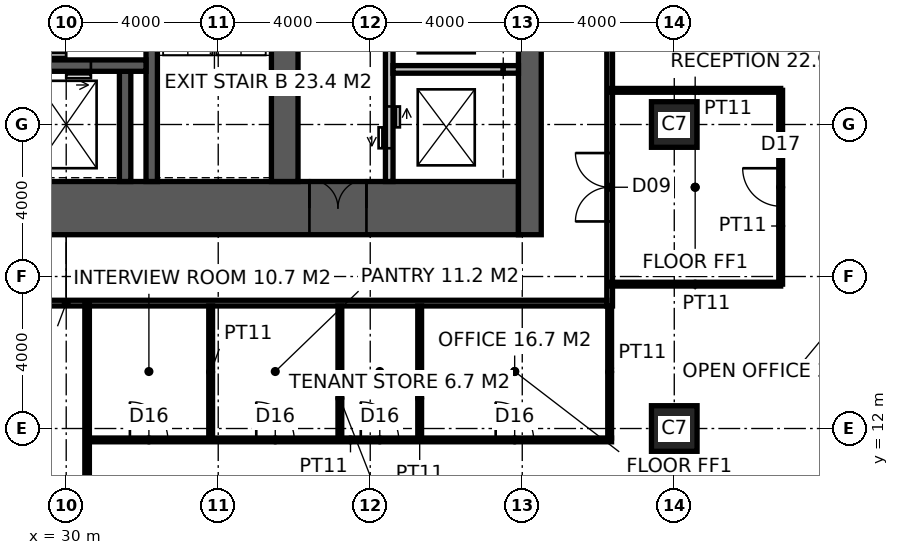
"""IFC4 building model, lengths in metres.
Left out: names, types, materials, properties, quantities, classifications, styles, units other than length and angle.
Written with IfcOpenShell. Run it as: python <this file> out.ifc"""

import sys

from ifc_helpers import new_model, si_unit, direction, frame, frame_2d, origin, origin_2d, place, context, subcontext, project, spatial, rectangle, hollow_rectangle, extrude, element, fill, save


model = new_model("IFC4")
c1 = context("Model", 3, precision=1e-05, world=origin(), true_north=direction((0.0, 1.0)))
c2 = subcontext(c1, "Body", "Model", "MODEL_VIEW")
j1 = project(units=[si_unit("LENGTHUNIT", "METRE"), si_unit("PLANEANGLEUNIT", "RADIAN")], contexts=[c1])
p1 = place(None, origin())
s1 = spatial("IfcSite", under=j1, at=p1, CompositionType="ELEMENT")
p2 = place(p1, origin())
s2 = spatial("IfcBuilding", under=s1, at=p2, CompositionType="ELEMENT")
p3 = place(p2, frame((0.0, 0.0, 43.0)))
s3 = spatial("IfcBuildingStorey", under=s2, at=p3, CompositionType="ELEMENT", Elevation=43.0)
for number, where, z_axis, x_axis in (
    (1, (46.0, 12.0, 0.0), (0.0, 0.0, 1.0), (1.0, 0.0, 0.0)),
    (2, (46.0, 20.0, 0.0), (0.0, 0.0, 1.0), (1.0, 0.0, 0.0)),
):
    element("IfcColumn", number, at=place(p3, frame(where, z_axis=z_axis, x_axis=x_axis)), inside=s3, PredefinedType="COLUMN", context=c2, shape_type="SweptSolid", body=[
        extrude(hollow_rectangle(XDim=1.2, YDim=1.2, WallThickness=0.1, at=origin_2d()), origin(), (0.0, 0.0, 1.0), 4.0),
    ])
p4 = place(p3, frame((18.5, 17.8, -0.15), z_axis=(0.0, 0.0, 1.0), x_axis=(1.0, 0.0, 0.0)))
e3 = element("IfcWall", 3, at=p4, inside=s3, PredefinedType="SHEAR", context=c2, shape_type="SweptSolid", body=[
    extrude(rectangle(XDim=23.4, YDim=1.4, at=frame_2d((11.7, 0.0))), origin(), (0.0, 0.0, 1.0), 4.0),
])
p5 = place(p4, frame((3.45, 0.0, 0.15)))
e4 = element("IfcOpeningElement", 4, at=p5, cuts=e3, PredefinedType="OPENING", context=c2, shape_type="SweptSolid", body=[
    extrude(rectangle(XDim=1.5, YDim=2.4, at=frame_2d((0.75, 1.2))), frame((0.0, 0.71, 0.0), z_axis=(0.0, -1.0, 0.0), x_axis=(1.0, 0.0, 0.0)), (0.0, 0.0, 1.0), 1.42),
])
p6 = place(p4, frame((17.9, 0.0, 0.15)))
e5 = element("IfcOpeningElement", 5, at=p6, cuts=e3, PredefinedType="OPENING", context=c2, shape_type="SweptSolid", body=[
    extrude(rectangle(XDim=1.5, YDim=2.4, at=frame_2d((0.75, 1.2))), frame((0.0, 0.71, 0.0), z_axis=(0.0, -1.0, 0.0), x_axis=(1.0, 0.0, 0.0)), (0.0, 0.0, 1.0), 1.42),
])
p7 = place(p4, frame((0.9, 0.0, 0.15)))
e6 = element("IfcOpeningElement", 6, at=p7, cuts=e3, PredefinedType="OPENING", context=c2, shape_type="SweptSolid", body=[
    extrude(rectangle(XDim=1.0, YDim=2.2, at=frame_2d((0.5, 1.1))), frame((0.0, 0.71, 0.0), z_axis=(0.0, -1.0, 0.0), x_axis=(1.0, 0.0, 0.0)), (0.0, 0.0, 1.0), 1.42),
])
p8 = place(p3, frame((42.2, 17.1, -0.15), z_axis=(0.0, 0.0, 1.0), x_axis=(0.0, 1.0, 0.0)))
e7 = element("IfcWall", 7, at=p8, inside=s3, PredefinedType="SHEAR", context=c2, shape_type="SweptSolid", body=[
    extrude(rectangle(XDim=19.8, YDim=0.6, at=frame_2d((9.9, 0.0))), origin(), (0.0, 0.0, 1.0), 4.0),
])
p9 = place(p3, frame((35.75, 18.5, -0.15), z_axis=(0.0, 0.0, 1.0), x_axis=(0.0, 1.0, 0.0)))
e8 = element("IfcWall", 8, at=p9, inside=s3, PredefinedType="SHEAR", context=c2, shape_type="SweptSolid", body=[
    extrude(rectangle(XDim=17.0, YDim=0.7, at=frame_2d((8.5, 0.0))), origin(), (0.0, 0.0, 1.0), 4.0),
])
p10 = place(p9, frame((9.85, 0.0, 0.15)))
e9 = element("IfcOpeningElement", 9, at=p10, cuts=e8, PredefinedType="OPENING", context=c2, shape_type="SweptSolid", body=[
    extrude(rectangle(XDim=1.0, YDim=2.2, at=frame_2d((0.5, 1.1))), frame((0.0, 0.36, 0.0), z_axis=(0.0, -1.0, 0.0), x_axis=(1.0, 0.0, 0.0)), (0.0, 0.0, 1.0), 0.72),
])
p11 = place(p3, frame((32.25, 18.5, -0.15), z_axis=(0.0, 0.0, 1.0), x_axis=(0.0, 1.0, 0.0)))
e10 = element("IfcWall", 10, at=p11, inside=s3, PredefinedType="SHEAR", context=c2, shape_type="SweptSolid", body=[
    extrude(rectangle(XDim=7.9, YDim=0.3, at=frame_2d((3.95, 0.0))), origin(), (0.0, 0.0, 1.0), 4.0),
])
p12 = place(p3, frame((31.55, 18.5, -0.15), z_axis=(0.0, 0.0, 1.0), x_axis=(0.0, 1.0, 0.0)))
e11 = element("IfcWall", 11, at=p12, inside=s3, PredefinedType="SHEAR", context=c2, shape_type="SweptSolid", body=[
    extrude(rectangle(XDim=2.9, YDim=0.3, at=frame_2d((1.45, 0.0))), origin(), (0.0, 0.0, 1.0), 4.0),
])
p13 = place(p3, frame((28.3, 21.55, -0.15), z_axis=(0.0, 0.0, 1.0), x_axis=(1.0, 0.0, 0.0)))
e12 = element("IfcWall", 12, at=p13, inside=s3, PredefinedType="SHEAR", context=c2, shape_type="SweptSolid", body=[
    extrude(rectangle(XDim=3.8, YDim=0.3, at=frame_2d((1.9, 0.0))), origin(), (0.0, 0.0, 1.0), 4.0),
])
p14 = place(p13, frame((1.05, 0.0, 0.15)))
e13 = element("IfcOpeningElement", 13, at=p14, cuts=e12, PredefinedType="OPENING", context=c2, shape_type="SweptSolid", body=[
    extrude(rectangle(XDim=1.3, YDim=2.4, at=frame_2d((0.65, 1.2))), frame((0.0, 0.16, 0.0), z_axis=(0.0, -1.0, 0.0), x_axis=(1.0, 0.0, 0.0)), (0.0, 0.0, 1.0), 0.32),
])
p15 = place(p3, frame((38.5, 18.5, -0.15), z_axis=(0.0, 0.0, 1.0), x_axis=(0.0, 1.0, 0.0)))
e14 = element("IfcWall", 14, at=p15, inside=s3, PredefinedType="SOLIDWALL", context=c2, shape_type="SweptSolid", body=[
    extrude(rectangle(XDim=11.5, YDim=0.2, at=frame_2d((5.75, 0.0))), origin(), (0.0, 0.0, 1.0), 4.0),
])
p16 = place(p15, frame((0.875, 0.0, 0.15)))
e15 = element("IfcOpeningElement", 15, at=p16, cuts=e14, PredefinedType="OPENING", context=c2, shape_type="SweptSolid", body=[
    extrude(rectangle(XDim=1.1, YDim=2.2, at=frame_2d((0.55, 1.1))), frame((0.0, 0.11, 0.0), z_axis=(0.0, -1.0, 0.0), x_axis=(1.0, 0.0, 0.0)), (0.0, 0.0, 1.0), 0.22),
])
p17 = place(p15, frame((3.825, 0.0, 0.15)))
e16 = element("IfcOpeningElement", 16, at=p17, cuts=e14, PredefinedType="OPENING", context=c2, shape_type="SweptSolid", body=[
    extrude(rectangle(XDim=1.1, YDim=2.2, at=frame_2d((0.55, 1.1))), frame((0.0, 0.11, 0.0), z_axis=(0.0, -1.0, 0.0), x_axis=(1.0, 0.0, 0.0)), (0.0, 0.0, 1.0), 0.22),
])
p18 = place(p15, frame((6.675, 0.0, 0.15)))
e17 = element("IfcOpeningElement", 17, at=p18, cuts=e14, PredefinedType="OPENING", context=c2, shape_type="SweptSolid", body=[
    extrude(rectangle(XDim=1.1, YDim=2.2, at=frame_2d((0.55, 1.1))), frame((0.0, 0.11, 0.0), z_axis=(0.0, -1.0, 0.0), x_axis=(1.0, 0.0, 0.0)), (0.0, 0.0, 1.0), 0.22),
])
p19 = place(p15, frame((9.575, 0.0, 0.15)))
e18 = element("IfcOpeningElement", 18, at=p19, cuts=e14, PredefinedType="OPENING", context=c2, shape_type="SweptSolid", body=[
    extrude(rectangle(XDim=1.1, YDim=2.2, at=frame_2d((0.55, 1.1))), frame((0.0, 0.11, 0.0), z_axis=(0.0, -1.0, 0.0), x_axis=(1.0, 0.0, 0.0)), (0.0, 0.0, 1.0), 0.22),
])
p20 = place(p3, frame((38.6, 21.45, -0.15), z_axis=(0.0, 0.0, 1.0), x_axis=(1.0, 0.0, 0.0)))
e19 = element("IfcWall", 19, at=p20, inside=s3, PredefinedType="SOLIDWALL", context=c2, shape_type="SweptSolid", body=[
    extrude(rectangle(XDim=2.9, YDim=0.2, at=frame_2d((1.45, 0.0))), origin(), (0.0, 0.0, 1.0), 4.0),
])
p21 = place(p3, frame((41.5, 21.45, -0.15), z_axis=(0.0, 0.0, 1.0), x_axis=(1.0, 0.0, 0.0)))
e20 = element("IfcWall", 20, at=p21, inside=s3, PredefinedType="SOLIDWALL", context=c2, shape_type="SweptSolid", body=[
    extrude(rectangle(XDim=0.4, YDim=0.2, at=frame_2d((0.2, 0.0))), origin(), (0.0, 0.0, 1.0), 4.0),
])
p22 = place(p3, frame((44.3, 15.225, 0.0), z_axis=(0.0, 0.0, 1.0), x_axis=(0.0, 1.0, 0.0)))
e21 = element("IfcWall", 21, at=p22, inside=s3, PredefinedType="PARTITIONING", context=c2, shape_type="SweptSolid", body=[
    extrude(rectangle(XDim=23.55, YDim=0.15, at=frame_2d((11.775, 0.0))), origin(), (0.0, 0.0, 1.0), 3.85),
])
p23 = place(p22, frame((2.224, 0.0, 0.0)))
e22 = element("IfcOpeningElement", 22, at=p23, cuts=e21, PredefinedType="OPENING", context=c2, shape_type="SweptSolid", body=[
    extrude(rectangle(XDim=1.8, YDim=2.4, at=frame_2d((0.9, 1.2))), frame((0.0, 0.085, 0.0), z_axis=(0.0, -1.0, 0.0), x_axis=(1.0, 0.0, 0.0)), (0.0, 0.0, 1.0), 0.17),
])
p24 = place(p22, frame((17.475, 0.0, 0.0)))
e23 = element("IfcOpeningElement", 23, at=p24, cuts=e21, PredefinedType="OPENING", context=c2, shape_type="SweptSolid", body=[
    extrude(rectangle(XDim=1.8, YDim=2.4, at=frame_2d((0.9, 1.2))), frame((0.0, 0.085, 0.0), z_axis=(0.0, -1.0, 0.0), x_axis=(1.0, 0.0, 0.0)), (0.0, 0.0, 1.0), 0.17),
])
p25 = place(p22, frame((10.275, 0.0, 0.0)))
e24 = element("IfcOpeningElement", 24, at=p25, cuts=e21, PredefinedType="OPENING", context=c2, shape_type="SweptSolid", body=[
    extrude(rectangle(XDim=1.0, YDim=2.2, at=frame_2d((0.5, 1.1))), frame((0.0, 0.085, 0.0), z_axis=(0.0, -1.0, 0.0), x_axis=(1.0, 0.0, 0.0)), (0.0, 0.0, 1.0), 0.17),
])
p26 = place(p3, frame((15.775, 15.3, 0.0), z_axis=(0.0, 0.0, 1.0), x_axis=(1.0, 0.0, 0.0)))
e25 = element("IfcWall", 25, at=p26, inside=s3, PredefinedType="PARTITIONING", context=c2, shape_type="SweptSolid", body=[
    extrude(rectangle(XDim=28.45, YDim=0.15, at=frame_2d((14.225, 0.0))), origin(), (0.0, 0.0, 1.0), 3.85),
])
p27 = place(p26, frame((11.725, 0.0, 0.0)))
e26 = element("IfcOpeningElement", 26, at=p27, cuts=e25, PredefinedType="OPENING", context=c2, shape_type="SweptSolid", body=[
    extrude(rectangle(XDim=1.0, YDim=2.2, at=frame_2d((0.5, 1.1))), frame((0.0, 0.085, 0.0), z_axis=(0.0, -1.0, 0.0), x_axis=(1.0, 0.0, 0.0)), (0.0, 0.0, 1.0), 0.17),
])
p28 = place(p3, frame((30.55, 0.68, 0.0), z_axis=(0.0, 0.0, 1.0), x_axis=(0.0, 1.0, 0.0)))
e27 = element("IfcWall", 27, at=p28, inside=s3, PredefinedType="PARTITIONING", context=c2, shape_type="SweptSolid", body=[
    extrude(rectangle(XDim=14.62, YDim=0.12, at=frame_2d((7.31, 0.0))), origin(), (0.0, 0.0, 1.0), 2.65),
])
p29 = place(p3, frame((30.611, 11.7, 0.0), z_axis=(0.0, 0.0, 1.0), x_axis=(1.0, 0.0, 0.0)))
e28 = element("IfcWall", 28, at=p29, inside=s3, PredefinedType="PARTITIONING", context=c2, shape_type="SweptSolid", body=[
    extrude(rectangle(XDim=13.739, YDim=0.1, at=frame_2d((6.87, 0.0))), origin(), (0.0, 0.0, 1.0), 3.85),
])
p30 = place(p29, frame((1.065, 0.0, 0.0)))
e29 = element("IfcOpeningElement", 29, at=p30, cuts=e28, PredefinedType="OPENING", context=c2, shape_type="SweptSolid", body=[
    extrude(rectangle(XDim=1.0, YDim=2.2, at=frame_2d((0.5, 1.1))), frame((0.0, 0.06, 0.0), z_axis=(0.0, -1.0, 0.0), x_axis=(1.0, 0.0, 0.0)), (0.0, 0.0, 1.0), 0.12),
])
p31 = place(p29, frame((4.39, 0.0, 0.0)))
e30 = element("IfcOpeningElement", 30, at=p31, cuts=e28, PredefinedType="OPENING", context=c2, shape_type="SweptSolid", body=[
    extrude(rectangle(XDim=1.0, YDim=2.2, at=frame_2d((0.5, 1.1))), frame((0.0, 0.06, 0.0), z_axis=(0.0, -1.0, 0.0), x_axis=(1.0, 0.0, 0.0)), (0.0, 0.0, 1.0), 0.12),
])
p32 = place(p29, frame((7.14, 0.0, 0.0)))
e31 = element("IfcOpeningElement", 31, at=p32, cuts=e28, PredefinedType="OPENING", context=c2, shape_type="SweptSolid", body=[
    extrude(rectangle(XDim=1.0, YDim=2.2, at=frame_2d((0.5, 1.1))), frame((0.0, 0.06, 0.0), z_axis=(0.0, -1.0, 0.0), x_axis=(1.0, 0.0, 0.0)), (0.0, 0.0, 1.0), 0.12),
])
p33 = place(p29, frame((10.689, 0.0, 0.0)))
e32 = element("IfcOpeningElement", 32, at=p33, cuts=e28, PredefinedType="OPENING", context=c2, shape_type="SweptSolid", body=[
    extrude(rectangle(XDim=1.0, YDim=2.2, at=frame_2d((0.5, 1.1))), frame((0.0, 0.06, 0.0), z_axis=(0.0, -1.0, 0.0), x_axis=(1.0, 0.0, 0.0)), (0.0, 0.0, 1.0), 0.12),
])
p34 = place(p3, frame((33.801, 11.75, 0.0), z_axis=(0.0, 0.0, 1.0), x_axis=(0.0, 1.0, 0.0)))
e33 = element("IfcWall", 33, at=p34, inside=s3, PredefinedType="PARTITIONING", context=c2, shape_type="SweptSolid", body=[
    extrude(rectangle(XDim=3.475, YDim=0.1, at=frame_2d((1.738, 0.0))), origin(), (0.0, 0.0, 1.0), 2.65),
])
for number, where, z_axis, x_axis in (
    (34, (37.201, 11.75, 0.0), (0.0, 0.0, 1.0), (0.0, 1.0, 0.0)),
    (35, (39.301, 11.75, 0.0), (0.0, 0.0, 1.0), (0.0, 1.0, 0.0)),
    (36, (44.3, 11.75, 0.0), (0.0, 0.0, 1.0), (0.0, 1.0, 0.0)),
):
    element("IfcWall", number, at=place(p3, frame(where, z_axis=z_axis, x_axis=x_axis)), inside=s3, PredefinedType="PARTITIONING", context=c2, shape_type="SweptSolid", body=[
        extrude(rectangle(XDim=3.475, YDim=0.1, at=frame_2d((1.738, 0.0))), origin(), (0.0, 0.0, 1.0), 3.85),
    ])
p35 = place(p3, frame((44.3, 15.799, 0.0), z_axis=(0.0, 0.0, 1.0), x_axis=(1.0, 0.0, 0.0)))
e37 = element("IfcWall", 37, at=p35, inside=s3, PredefinedType="PARTITIONING", context=c2, shape_type="SweptSolid", body=[
    extrude(rectangle(XDim=4.5, YDim=0.1, at=frame_2d((2.25, 0.0))), origin(), (0.0, 0.0, 1.0), 3.85),
])
p36 = place(p3, frame((48.8, 15.799, 0.0), z_axis=(0.0, 0.0, 1.0), x_axis=(0.0, 1.0, 0.0)))
e38 = element("IfcWall", 38, at=p36, inside=s3, PredefinedType="PARTITIONING", context=c2, shape_type="SweptSolid", body=[
    extrude(rectangle(XDim=5.1, YDim=0.1, at=frame_2d((2.55, 0.0))), origin(), (0.0, 0.0, 1.0), 3.85),
])
p37 = place(p36, frame((2.05, 0.0, 0.0)))
e39 = element("IfcOpeningElement", 39, at=p37, cuts=e38, PredefinedType="OPENING", context=c2, shape_type="SweptSolid", body=[
    extrude(rectangle(XDim=1.0, YDim=2.2, at=frame_2d((0.5, 1.1))), frame((0.0, 0.06, 0.0), z_axis=(0.0, -1.0, 0.0), x_axis=(1.0, 0.0, 0.0)), (0.0, 0.0, 1.0), 0.12),
])
p38 = place(p3, frame((48.8, 20.899, 0.0), z_axis=(0.0, 0.0, 1.0), x_axis=(-1.0, 0.0, 0.0)))
e40 = element("IfcWall", 40, at=p38, inside=s3, PredefinedType="PARTITIONING", context=c2, shape_type="SweptSolid", body=[
    extrude(rectangle(XDim=4.5, YDim=0.1, at=frame_2d((2.25, 0.0))), origin(), (0.0, 0.0, 1.0), 3.85),
])
p39 = place(p6, origin())
e41 = element("IfcDoor", 41, at=p39, inside=s3, OperationType="DOUBLE_DOOR_DOUBLE_SWING", PredefinedType="DOOR", context=c2, shape_type="SweptSolid", body=[
    extrude(rectangle(XDim=1.5, YDim=2.4, at=frame_2d((0.75, 1.2))), frame((0.0, 0.025, 0.0), z_axis=(0.0, -1.0, 0.0), x_axis=(1.0, 0.0, 0.0)), (0.0, 0.0, 1.0), 0.05),
])
fill(e5, e41)
p40 = place(p23, origin())
e42 = element("IfcDoor", 42, at=p40, inside=s3, OperationType="DOUBLE_DOOR_DOUBLE_SWING", PredefinedType="DOOR", context=c2, shape_type="SweptSolid", body=[
    extrude(rectangle(XDim=1.8, YDim=2.4, at=frame_2d((0.9, 1.2))), frame((0.0, 0.025, 0.0), z_axis=(0.0, -1.0, 0.0), x_axis=(1.0, 0.0, 0.0)), (0.0, 0.0, 1.0), 0.05),
])
fill(e22, e42)
p41 = place(p30, origin())
e43 = element("IfcDoor", 43, at=p41, inside=s3, OperationType="SINGLE_SWING_LEFT", PredefinedType="DOOR", context=c2, shape_type="SweptSolid", body=[
    extrude(rectangle(XDim=1.0, YDim=2.2, at=frame_2d((0.5, 1.1))), frame((0.0, 0.025, 0.0), z_axis=(0.0, -1.0, 0.0), x_axis=(1.0, 0.0, 0.0)), (0.0, 0.0, 1.0), 0.05),
])
fill(e29, e43)
p42 = place(p31, origin())
e44 = element("IfcDoor", 44, at=p42, inside=s3, OperationType="SINGLE_SWING_LEFT", PredefinedType="DOOR", context=c2, shape_type="SweptSolid", body=[
    extrude(rectangle(XDim=1.0, YDim=2.2, at=frame_2d((0.5, 1.1))), frame((0.0, 0.025, 0.0), z_axis=(0.0, -1.0, 0.0), x_axis=(1.0, 0.0, 0.0)), (0.0, 0.0, 1.0), 0.05),
])
fill(e30, e44)
p43 = place(p32, origin())
e45 = element("IfcDoor", 45, at=p43, inside=s3, OperationType="SINGLE_SWING_LEFT", PredefinedType="DOOR", context=c2, shape_type="SweptSolid", body=[
    extrude(rectangle(XDim=1.0, YDim=2.2, at=frame_2d((0.5, 1.1))), frame((0.0, 0.025, 0.0), z_axis=(0.0, -1.0, 0.0), x_axis=(1.0, 0.0, 0.0)), (0.0, 0.0, 1.0), 0.05),
])
fill(e31, e45)
p44 = place(p33, origin())
e46 = element("IfcDoor", 46, at=p44, inside=s3, OperationType="SINGLE_SWING_LEFT", PredefinedType="DOOR", context=c2, shape_type="SweptSolid", body=[
    extrude(rectangle(XDim=1.0, YDim=2.2, at=frame_2d((0.5, 1.1))), frame((0.0, 0.025, 0.0), z_axis=(0.0, -1.0, 0.0), x_axis=(1.0, 0.0, 0.0)), (0.0, 0.0, 1.0), 0.05),
])
fill(e32, e46)
p45 = place(p37, origin())
e47 = element("IfcDoor", 47, at=p45, inside=s3, OperationType="SINGLE_SWING_RIGHT", PredefinedType="DOOR", context=c2, shape_type="SweptSolid", body=[
    extrude(rectangle(XDim=1.0, YDim=2.2, at=frame_2d((0.5, 1.1))), frame((0.0, 0.025, 0.0), z_axis=(0.0, -1.0, 0.0), x_axis=(1.0, 0.0, 0.0)), (0.0, 0.0, 1.0), 0.05),
])
fill(e39, e47)
p46 = place(p14, origin())
e48 = element("IfcDoor", 48, at=p46, inside=s3, OperationType="DOUBLE_DOOR_SLIDING", PredefinedType="DOOR", context=c2, shape_type="SweptSolid", body=[
    extrude(rectangle(XDim=1.3, YDim=2.4, at=frame_2d((0.65, 1.2))), frame((0.0, 0.025, 0.0), z_axis=(0.0, -1.0, 0.0), x_axis=(1.0, 0.0, 0.0)), (0.0, 0.0, 1.0), 0.05),
])
fill(e13, e48)
p47 = place(p16, origin())
e49 = element("IfcDoor", 49, at=p47, inside=s3, OperationType="DOUBLE_DOOR_SLIDING", PredefinedType="DOOR", context=c2, shape_type="SweptSolid", body=[
    extrude(rectangle(XDim=1.1, YDim=2.2, at=frame_2d((0.55, 1.1))), frame((0.0, 0.025, 0.0), z_axis=(0.0, -1.0, 0.0), x_axis=(1.0, 0.0, 0.0)), (0.0, 0.0, 1.0), 0.05),
])
fill(e15, e49)
save(model, sys.argv[1])
